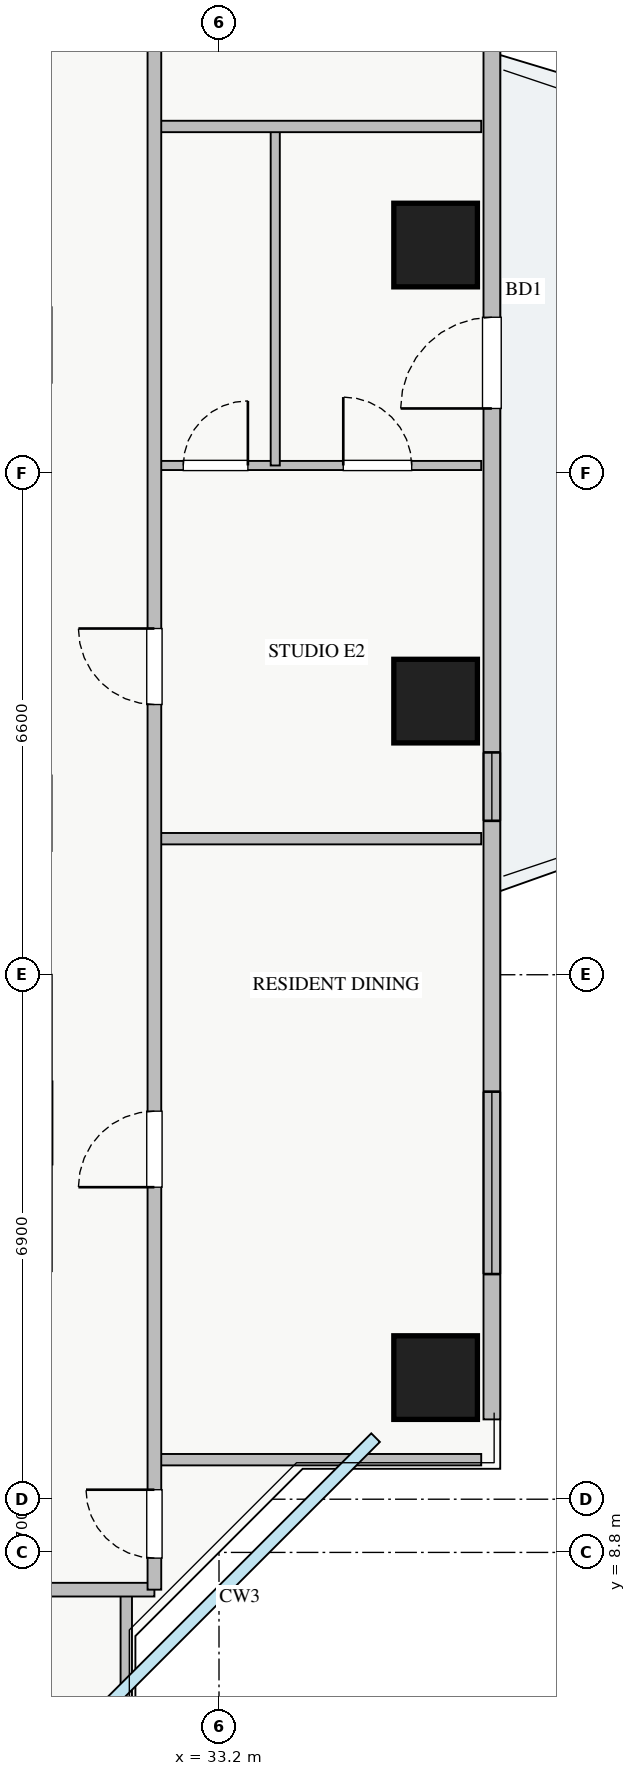
"""IFC4 building model, lengths in metres.
Left out: names, types, materials, properties, quantities, classifications, styles, units other than length and angle.
Written with IfcOpenShell. Run it as: python <this file> out.ifc"""

import sys

from ifc_helpers import new_model, si_unit, direction, frame, frame_2d, origin, origin_2d, place, context, subcontext, project, spatial, rectangle, extrude, source, transform, mapped, element, fill, save


model = new_model("IFC4")
c1 = context("Model", 3, precision=1e-05, world=origin(), true_north=direction((0.0, 1.0)))
c2 = subcontext(c1, "Body", "Model", "MODEL_VIEW")
j1 = project(units=[si_unit("LENGTHUNIT", "METRE"), si_unit("PLANEANGLEUNIT", "RADIAN")], contexts=[c1])
p1 = place(None, origin())
s1 = spatial("IfcSite", under=j1, at=p1, CompositionType="ELEMENT")
p2 = place(p1, origin())
s2 = spatial("IfcBuilding", under=s1, at=p2, CompositionType="ELEMENT")
p3 = place(p2, frame((0.0, 0.0, 123.0)))
s3 = spatial("IfcBuildingStorey", under=s2, at=p3, CompositionType="ELEMENT", Elevation=123.0)
m1 = source(origin(), c2, "Body", "SweptSolid", [
    extrude(rectangle(XDim=1.1, YDim=1.1, at=origin_2d()), origin(), (0.0, 0.0, 1.0), 3.25),
])
for number, where, z_axis, x_axis in (
    (1, (36.05, 11.1, 0.0), (0.0, 0.0, 1.0), (1.0, 0.0, 0.0)),
    (2, (36.05, 20.0, 0.0), (0.0, 0.0, 1.0), (1.0, 0.0, 0.0)),
    (3, (36.05, 26.0, 0.0), (0.0, 0.0, 1.0), (1.0, 0.0, 0.0)),
):
    element("IfcColumn", number, at=place(p3, frame(where, z_axis=z_axis, x_axis=x_axis)), inside=s3, PredefinedType="COLUMN", context=c2, shape_type="MappedRepresentation", body=[
        mapped(m1, transform((0.0, 0.0, 0.0), x_axis=(1.0, 0.0, 0.0), y_axis=(0.0, 1.0, 0.0), z_axis=(0.0, 0.0, 1.0), scale=1.0)),
    ])
p4 = place(p3, frame((36.79, 10.55, 0.0), z_axis=(0.0, 0.0, 1.0), x_axis=(0.0, 1.0, 0.0)))
e4 = element("IfcWall", 4, at=p4, inside=s3, PredefinedType="STANDARD", context=c2, shape_type="SweptSolid", body=[
    extrude(rectangle(XDim=24.9, YDim=0.22, at=frame_2d((12.45, 0.0))), origin(), (0.0, 0.0, 1.0), 2.61),
])
p5 = place(p4, frame((13.3, 0.0, 0.0)))
e5 = element("IfcOpeningElement", 5, at=p5, cuts=e4, PredefinedType="OPENING", context=c2, shape_type="SweptSolid", body=[
    extrude(rectangle(XDim=1.2, YDim=2.1, at=frame_2d((0.6, 1.05))), frame((0.0, 0.12, 0.0), z_axis=(0.0, -1.0, 0.0), x_axis=(1.0, 0.0, 0.0)), (0.0, 0.0, 1.0), 0.24),
])
p6 = place(p4, frame((1.912, 0.0, 0.9)))
e6 = element("IfcOpeningElement", 6, at=p6, cuts=e4, PredefinedType="OPENING", context=c2, shape_type="SweptSolid", body=[
    extrude(rectangle(XDim=2.4, YDim=1.48, at=frame_2d((1.2, 0.74))), frame((0.0, 0.12, 0.0), z_axis=(0.0, -1.0, 0.0), x_axis=(1.0, 0.0, 0.0)), (0.0, 0.0, 1.0), 0.24),
])
p7 = place(p4, frame((22.165, 0.0, 0.9)))
e7 = element("IfcOpeningElement", 7, at=p7, cuts=e4, PredefinedType="OPENING", context=c2, shape_type="SweptSolid", body=[
    extrude(rectangle(XDim=2.1, YDim=1.5, at=frame_2d((1.05, 0.75))), frame((0.0, 0.12, 0.0), z_axis=(0.0, -1.0, 0.0), x_axis=(1.0, 0.0, 0.0)), (0.0, 0.0, 1.0), 0.24),
])
p8 = place(p4, frame((18.093, 0.0, 0.9)))
e8 = element("IfcOpeningElement", 8, at=p8, cuts=e4, PredefinedType="OPENING", context=c2, shape_type="SweptSolid", body=[
    extrude(rectangle(XDim=2.4, YDim=1.5, at=frame_2d((1.2, 0.75))), frame((0.0, 0.12, 0.0), z_axis=(0.0, -1.0, 0.0), x_axis=(1.0, 0.0, 0.0)), (0.0, 0.0, 1.0), 0.24),
])
p9 = place(p4, frame((7.875, 0.0, 0.9)))
e9 = element("IfcOpeningElement", 9, at=p9, cuts=e4, PredefinedType="OPENING", context=c2, shape_type="SweptSolid", body=[
    extrude(rectangle(XDim=0.9, YDim=1.2, at=frame_2d((0.45, 0.6))), frame((0.0, 0.12, 0.0), z_axis=(0.0, -1.0, 0.0), x_axis=(1.0, 0.0, 0.0)), (0.0, 0.0, 1.0), 0.24),
])
p10 = place(p3, frame((31.98, 5.35, 0.0), z_axis=(0.0, 0.0, 1.0), x_axis=(0.0, 1.0, 0.0)))
e10 = element("IfcWall", 10, at=p10, inside=s3, PredefinedType="PARTITIONING", context=c2, shape_type="SweptSolid", body=[
    extrude(rectangle(XDim=2.96, YDim=0.15, at=frame_2d((1.48, 0.0))), origin(), (0.0, 0.0, 1.0), 3.07),
])
p11 = place(p3, frame((8.72, 8.31, 0.0), z_axis=(0.0, 0.0, 1.0), x_axis=(1.0, 0.0, 0.0)))
e11 = element("IfcWall", 11, at=p11, inside=s3, PredefinedType="PARTITIONING", context=c2, shape_type="SweptSolid", body=[
    extrude(rectangle(XDim=23.63, YDim=0.18, at=frame_2d((11.815, 0.0))), origin(), (0.0, 0.0, 1.0), 3.07),
])
p12 = place(p11, frame((4.69, 0.0, 0.0)))
e12 = element("IfcOpeningElement", 12, at=p12, cuts=e11, PredefinedType="OPENING", context=c2, shape_type="SweptSolid", body=[
    extrude(rectangle(XDim=1.0, YDim=2.05, at=frame_2d((0.5, 1.025))), frame((0.0, 0.1, 0.0), z_axis=(0.0, -1.0, 0.0), x_axis=(1.0, 0.0, 0.0)), (0.0, 0.0, 1.0), 0.2),
])
p13 = place(p11, frame((16.32, 0.0, 0.0)))
e13 = element("IfcOpeningElement", 13, at=p13, cuts=e11, PredefinedType="OPENING", context=c2, shape_type="SweptSolid", body=[
    extrude(rectangle(XDim=1.0, YDim=2.05, at=frame_2d((0.5, 1.025))), frame((0.0, 0.1, 0.0), z_axis=(0.0, -1.0, 0.0), x_axis=(1.0, 0.0, 0.0)), (0.0, 0.0, 1.0), 0.2),
])
p14 = place(p3, frame((32.35, 10.02, 0.0), z_axis=(0.0, 0.0, 1.0), x_axis=(1.0, 0.0, 0.0)))
e14 = element("IfcWall", 14, at=p14, inside=s3, PredefinedType="PARTITIONING", context=c2, shape_type="SweptSolid", body=[
    extrude(rectangle(XDim=4.3, YDim=0.15, at=frame_2d((2.15, 0.0))), origin(), (0.0, 0.0, 1.0), 3.07),
])
p15 = place(p3, frame((32.35, 23.1, 0.0), z_axis=(0.0, 0.0, 1.0), x_axis=(1.0, 0.0, 0.0)))
e15 = element("IfcWall", 15, at=p15, inside=s3, PredefinedType="PLUMBINGWALL", context=c2, shape_type="SweptSolid", body=[
    extrude(rectangle(XDim=4.3, YDim=0.12, at=frame_2d((2.15, 0.0))), origin(), (0.0, 0.0, 1.0), 3.07),
])
p16 = place(p15, frame((0.38, 0.0, 0.0)))
e16 = element("IfcOpeningElement", 16, at=p16, cuts=e15, PredefinedType="OPENING", context=c2, shape_type="SweptSolid", body=[
    extrude(rectangle(XDim=0.85, YDim=2.05, at=frame_2d((0.425, 1.025))), frame((0.0, 0.07, 0.0), z_axis=(0.0, -1.0, 0.0), x_axis=(1.0, 0.0, 0.0)), (0.0, 0.0, 1.0), 0.14),
])
p17 = place(p15, frame((2.485, 0.0, 0.0)))
e17 = element("IfcOpeningElement", 17, at=p17, cuts=e15, PredefinedType="OPENING", context=c2, shape_type="SweptSolid", body=[
    extrude(rectangle(XDim=0.9, YDim=2.05, at=frame_2d((0.45, 1.025))), frame((0.0, 0.07, 0.0), z_axis=(0.0, -1.0, 0.0), x_axis=(1.0, 0.0, 0.0)), (0.0, 0.0, 1.0), 0.14),
])
p18 = place(p3, frame((33.94, 23.1, 0.0), z_axis=(0.0, 0.0, 1.0), x_axis=(0.0, 1.0, 0.0)))
e18 = element("IfcWall", 18, at=p18, inside=s3, PredefinedType="PLUMBINGWALL", context=c2, shape_type="SweptSolid", body=[
    extrude(rectangle(XDim=4.46, YDim=0.12, at=frame_2d((2.23, 0.0))), origin(), (0.0, 0.0, 1.0), 3.07),
])
p19 = place(p3, frame((32.35, 18.19, 0.0), z_axis=(0.0, 0.0, 1.0), x_axis=(1.0, 0.0, 0.0)))
e19 = element("IfcWall", 19, at=p19, inside=s3, PredefinedType="PARTITIONING", context=c2, shape_type="SweptSolid", body=[
    extrude(rectangle(XDim=4.3, YDim=0.15, at=frame_2d((2.15, 0.0))), origin(), (0.0, 0.0, 1.0), 2.771),
])
p20 = place(p3, frame((32.35, 27.56, 0.0), z_axis=(0.0, 0.0, 1.0), x_axis=(1.0, 0.0, 0.0)))
e20 = element("IfcWall", 20, at=p20, inside=s3, PredefinedType="PARTITIONING", context=c2, shape_type="SweptSolid", body=[
    extrude(rectangle(XDim=4.3, YDim=0.15, at=frame_2d((2.15, 0.0))), origin(), (0.0, 0.0, 1.0), 3.07),
])
p21 = place(p3, frame((32.35, 8.31, 0.0), z_axis=(0.0, 0.0, 1.0), x_axis=(0.0, 1.0, 0.0)))
e21 = element("IfcWall", 21, at=p21, inside=s3, PredefinedType="PARTITIONING", context=c2, shape_type="SweptSolid", body=[
    extrude(rectangle(XDim=29.37, YDim=0.18, at=frame_2d((14.685, 0.0))), origin(), (0.0, 0.0, 1.0), 3.07),
])
p22 = place(p21, frame((28.06, 0.0, 0.0)))
e22 = element("IfcOpeningElement", 22, at=p22, cuts=e21, PredefinedType="OPENING", context=c2, shape_type="SweptSolid", body=[
    extrude(rectangle(XDim=0.9, YDim=2.05, at=frame_2d((0.45, 1.025))), frame((0.0, 0.1, 0.0), z_axis=(0.0, -1.0, 0.0), x_axis=(1.0, 0.0, 0.0)), (0.0, 0.0, 1.0), 0.2),
])
p23 = place(p21, frame((0.415, 0.0, 0.0)))
e23 = element("IfcOpeningElement", 23, at=p23, cuts=e21, PredefinedType="OPENING", context=c2, shape_type="SweptSolid", body=[
    extrude(rectangle(XDim=0.9, YDim=2.05, at=frame_2d((0.45, 1.025))), frame((0.0, 0.1, 0.0), z_axis=(0.0, -1.0, 0.0), x_axis=(1.0, 0.0, 0.0)), (0.0, 0.0, 1.0), 0.2),
])
p24 = place(p21, frame((5.295, 0.0, 0.0)))
e24 = element("IfcOpeningElement", 24, at=p24, cuts=e21, PredefinedType="OPENING", context=c2, shape_type="SweptSolid", body=[
    extrude(rectangle(XDim=1.0, YDim=2.05, at=frame_2d((0.5, 1.025))), frame((0.0, 0.1, 0.0), z_axis=(0.0, -1.0, 0.0), x_axis=(1.0, 0.0, 0.0)), (0.0, 0.0, 1.0), 0.2),
])
p25 = place(p21, frame((11.645, 0.0, 0.0)))
e25 = element("IfcOpeningElement", 25, at=p25, cuts=e21, PredefinedType="OPENING", context=c2, shape_type="SweptSolid", body=[
    extrude(rectangle(XDim=1.0, YDim=2.05, at=frame_2d((0.5, 1.025))), frame((0.0, 0.1, 0.0), z_axis=(0.0, -1.0, 0.0), x_axis=(1.0, 0.0, 0.0)), (0.0, 0.0, 1.0), 0.2),
])
p26 = place(p21, frame((20.835, 0.0, 0.0)))
e26 = element("IfcOpeningElement", 26, at=p26, cuts=e21, PredefinedType="OPENING", context=c2, shape_type="SweptSolid", body=[
    extrude(rectangle(XDim=1.0, YDim=2.05, at=frame_2d((0.5, 1.025))), frame((0.0, 0.1, 0.0), z_axis=(0.0, -1.0, 0.0), x_axis=(1.0, 0.0, 0.0)), (0.0, 0.0, 1.0), 0.2),
])
m2 = source(origin(), c2, "Body", "SweptSolid", [
    extrude(rectangle(XDim=1.2, YDim=2.1, at=frame_2d((0.6, 1.05))), frame((0.0, 0.025, 0.0), z_axis=(0.0, -1.0, 0.0), x_axis=(1.0, 0.0, 0.0)), (0.0, 0.0, 1.0), 0.05),
])
p27 = place(p5, origin())
e27 = element("IfcDoor", 27, at=p27, inside=s3, OperationType="SINGLE_SWING_LEFT", PredefinedType="DOOR", context=c2, shape_type="MappedRepresentation", body=[
    mapped(m2, transform((0.0, 0.0, 0.0), x_axis=(1.0, 0.0, 0.0), y_axis=(0.0, 1.0, 0.0), z_axis=(0.0, 0.0, 1.0), scale=1.0)),
])
fill(e5, e27)
m3 = source(origin(), c2, "Body", "SweptSolid", [
    extrude(rectangle(XDim=2.4, YDim=1.48, at=frame_2d((1.2, 0.74))), frame((0.0, 0.03, 0.0), z_axis=(0.0, -1.0, 0.0), x_axis=(1.0, 0.0, 0.0)), (0.0, 0.0, 1.0), 0.06),
])
p28 = place(p6, origin())
e28 = element("IfcWindow", 28, at=p28, inside=s3, PartitioningType="TRIPLE_PANEL_VERTICAL", PredefinedType="WINDOW", context=c2, shape_type="MappedRepresentation", body=[
    mapped(m3, transform((0.0, 0.0, 0.0), x_axis=(1.0, 0.0, 0.0), y_axis=(0.0, 1.0, 0.0), z_axis=(0.0, 0.0, 1.0), scale=1.0)),
])
fill(e6, e28)
m4 = source(origin(), c2, "Body", "SweptSolid", [
    extrude(rectangle(XDim=0.85, YDim=2.05, at=frame_2d((0.425, 1.025))), frame((0.0, 0.025, 0.0), z_axis=(0.0, -1.0, 0.0), x_axis=(1.0, 0.0, 0.0)), (0.0, 0.0, 1.0), 0.05),
])
p29 = place(p16, origin())
e29 = element("IfcDoor", 29, at=p29, inside=s3, OperationType="SINGLE_SWING_RIGHT", PredefinedType="DOOR", context=c2, shape_type="MappedRepresentation", body=[
    mapped(m4, transform((0.0, 0.0, 0.0), x_axis=(1.0, 0.0, 0.0), y_axis=(0.0, 1.0, 0.0), z_axis=(0.0, 0.0, 1.0), scale=1.0)),
])
fill(e16, e29)
m5 = source(origin(), c2, "Body", "SweptSolid", [
    extrude(rectangle(XDim=0.9, YDim=2.05, at=frame_2d((0.45, 1.025))), frame((0.0, 0.025, 0.0), z_axis=(0.0, -1.0, 0.0), x_axis=(1.0, 0.0, 0.0)), (0.0, 0.0, 1.0), 0.05),
])
p30 = place(p17, origin())
e30 = element("IfcDoor", 30, at=p30, inside=s3, OperationType="SINGLE_SWING_LEFT", PredefinedType="DOOR", context=c2, shape_type="MappedRepresentation", body=[
    mapped(m5, transform((0.0, 0.0, 0.0), x_axis=(1.0, 0.0, 0.0), y_axis=(0.0, 1.0, 0.0), z_axis=(0.0, 0.0, 1.0), scale=1.0)),
])
fill(e17, e30)
p31 = place(p23, origin())
e31 = element("IfcDoor", 31, at=p31, inside=s3, OperationType="SINGLE_SWING_RIGHT", PredefinedType="DOOR", context=c2, shape_type="MappedRepresentation", body=[
    mapped(m5, transform((0.0, 0.0, 0.0), x_axis=(1.0, 0.0, 0.0), y_axis=(0.0, 1.0, 0.0), z_axis=(0.0, 0.0, 1.0), scale=1.0)),
])
fill(e23, e31)
m6 = source(origin(), c2, "Body", "SweptSolid", [
    extrude(rectangle(XDim=1.0, YDim=2.05, at=frame_2d((0.5, 1.025))), frame((0.0, 0.025, 0.0), z_axis=(0.0, -1.0, 0.0), x_axis=(1.0, 0.0, 0.0)), (0.0, 0.0, 1.0), 0.05),
])
p32 = place(p24, origin())
e32 = element("IfcDoor", 32, at=p32, inside=s3, OperationType="SINGLE_SWING_LEFT", PredefinedType="DOOR", context=c2, shape_type="MappedRepresentation", body=[
    mapped(m6, transform((0.0, 0.0, 0.0), x_axis=(1.0, 0.0, 0.0), y_axis=(0.0, 1.0, 0.0), z_axis=(0.0, 0.0, 1.0), scale=1.0)),
])
fill(e24, e32)
p33 = place(p25, origin())
e33 = element("IfcDoor", 33, at=p33, inside=s3, OperationType="SINGLE_SWING_RIGHT", PredefinedType="DOOR", context=c2, shape_type="MappedRepresentation", body=[
    mapped(m6, transform((0.0, 0.0, 0.0), x_axis=(1.0, 0.0, 0.0), y_axis=(0.0, 1.0, 0.0), z_axis=(0.0, 0.0, 1.0), scale=1.0)),
])
fill(e25, e33)
m7 = source(origin(), c2, "Body", "SweptSolid", [
    extrude(rectangle(XDim=0.9, YDim=1.2, at=frame_2d((0.45, 0.6))), frame((0.0, 0.03, 0.0), z_axis=(0.0, -1.0, 0.0), x_axis=(1.0, 0.0, 0.0)), (0.0, 0.0, 1.0), 0.06),
])
p34 = place(p9, origin())
e34 = element("IfcWindow", 34, at=p34, inside=s3, PartitioningType="SINGLE_PANEL", PredefinedType="WINDOW", context=c2, shape_type="MappedRepresentation", body=[
    mapped(m7, transform((0.0, 0.0, 0.0), x_axis=(1.0, 0.0, 0.0), y_axis=(0.0, 1.0, 0.0), z_axis=(0.0, 0.0, 1.0), scale=1.0)),
])
fill(e9, e34)
save(model, sys.argv[1])
